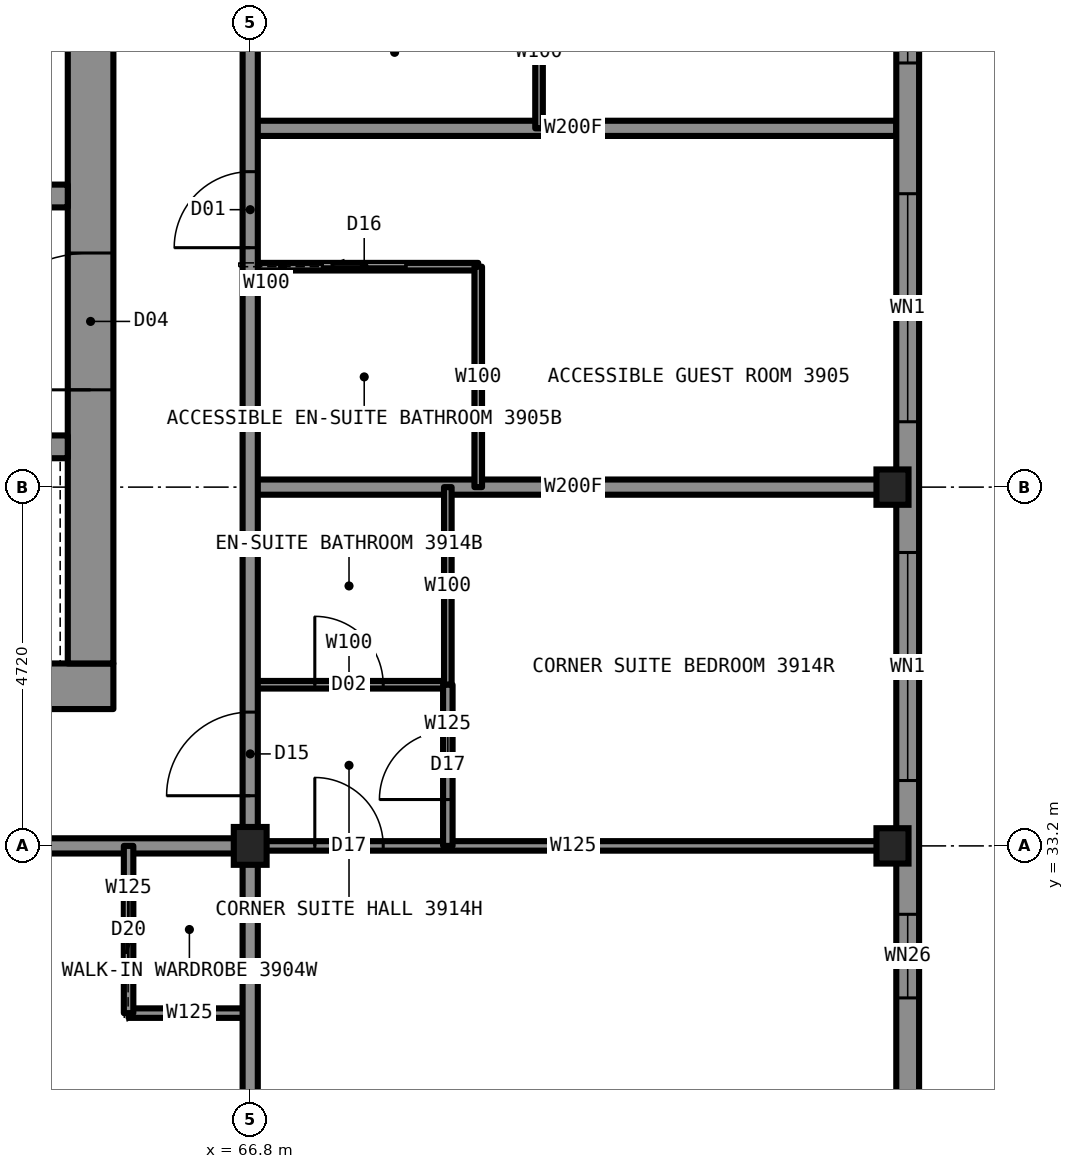
"""IFC4 building model, lengths in metres.
Left out: names, types, materials, properties, quantities, classifications, styles, units other than length and angle.
Written with IfcOpenShell. Run it as: python <this file> out.ifc"""

import sys

from ifc_helpers import new_model, si_unit, direction, frame, frame_2d, origin, origin_2d, place, context, subcontext, project, spatial, rectangle, i_section, extrude, element, fill, save


model = new_model("IFC4")
c1 = context("Model", 3, precision=1e-05, world=origin(), true_north=direction((0.0, 1.0)))
c2 = subcontext(c1, "Body", "Model", "MODEL_VIEW")
j1 = project(units=[si_unit("LENGTHUNIT", "METRE"), si_unit("PLANEANGLEUNIT", "RADIAN")], contexts=[c1])
p1 = place(None, origin())
s1 = spatial("IfcSite", under=j1, at=p1, CompositionType="ELEMENT")
p2 = place(p1, origin())
s2 = spatial("IfcBuilding", under=s1, at=p2, CompositionType="ELEMENT")
p3 = place(p2, frame((0.0, 0.0, 145.9)))
s3 = spatial("IfcBuildingStorey", under=s2, at=p3, CompositionType="ELEMENT", Elevation=145.9)
for number, where, z_axis, x_axis in (
    (1, (75.25, 33.2, 0.0), (0.0, 0.0, 1.0), (1.0, 0.0, 0.0)),
    (2, (75.25, 37.92, 0.0), (0.0, 0.0, 1.0), (1.0, 0.0, 0.0)),
):
    element("IfcColumn", number, at=place(p3, frame(where, z_axis=z_axis, x_axis=x_axis)), inside=s3, PredefinedType="COLUMN", context=c2, shape_type="SweptSolid", body=[
        extrude(i_section(OverallWidth=0.422, OverallDepth=0.465, WebThickness=0.045, FlangeThickness=0.073, at=origin_2d()), origin(), (0.0, 0.0, 1.0), 3.5),
    ])
p4 = place(p3, frame((66.8, 33.2, 0.0), z_axis=(0.0, 0.0, 1.0), x_axis=(1.0, 0.0, 0.0)))
e3 = element("IfcColumn", 3, at=p4, inside=s3, PredefinedType="COLUMN", context=c2, shape_type="SweptSolid", body=[
    extrude(i_section(OverallWidth=0.432, OverallDepth=0.498, WebThickness=0.056, FlangeThickness=0.089, at=origin_2d()), origin(), (0.0, 0.0, 1.0), 3.5),
])
p5 = place(p3, frame((45.0, 35.3, 0.0), z_axis=(0.0, 0.0, 1.0), x_axis=(1.0, 0.0, 0.0)))
e4 = element("IfcWall", 4, at=p5, inside=s3, PredefinedType="SHEAR", context=c2, shape_type="SweptSolid", body=[
    extrude(rectangle(XDim=20.0, YDim=0.6, at=frame_2d((10.0, 0.0))), origin(), (0.0, 0.0, 1.0), 3.5),
])
p6 = place(p3, frame((64.7, 35.6, 0.0), z_axis=(0.0, 0.0, 1.0), x_axis=(0.0, 1.0, 0.0)))
e5 = element("IfcWall", 5, at=p6, inside=s3, PredefinedType="SHEAR", context=c2, shape_type="SweptSolid", body=[
    extrude(rectangle(XDim=18.8, YDim=0.6, at=frame_2d((9.4, 0.0))), origin(), (0.0, 0.0, 1.0), 3.5),
])
p7 = place(p6, frame((13.4, 0.0, 0.0)))
e6 = element("IfcOpeningElement", 6, at=p7, cuts=e5, PredefinedType="OPENING", context=c2, shape_type="SweptSolid", body=[
    extrude(rectangle(XDim=1.8, YDim=2.2, at=frame_2d((0.9, 1.1))), frame((0.0, 0.31, 0.0), z_axis=(0.0, -1.0, 0.0), x_axis=(1.0, 0.0, 0.0)), (0.0, 0.0, 1.0), 0.62),
])
p8 = place(p6, frame((3.6, 0.0, 0.0)))
e7 = element("IfcOpeningElement", 7, at=p8, cuts=e5, PredefinedType="OPENING", context=c2, shape_type="SweptSolid", body=[
    extrude(rectangle(XDim=1.8, YDim=2.2, at=frame_2d((0.9, 1.1))), frame((0.0, 0.31, 0.0), z_axis=(0.0, -1.0, 0.0), x_axis=(1.0, 0.0, 0.0)), (0.0, 0.0, 1.0), 0.62),
])
p9 = place(p3, frame((45.6, 38.45, 0.0), z_axis=(0.0, 0.0, 1.0), x_axis=(1.0, 0.0, 0.0)))
e8 = element("IfcWall", 8, at=p9, inside=s3, PredefinedType="SHEAR", context=c2, shape_type="SweptSolid", body=[
    extrude(rectangle(XDim=18.8, YDim=0.3, at=frame_2d((9.4, 0.0))), origin(), (0.0, 0.0, 1.0), 3.5),
])
p10 = place(p3, frame((56.2, 41.75, 0.0), z_axis=(0.0, 0.0, 1.0), x_axis=(1.0, 0.0, 0.0)))
e9 = element("IfcWall", 9, at=p10, inside=s3, PredefinedType="SHEAR", context=c2, shape_type="SweptSolid", body=[
    extrude(rectangle(XDim=8.2, YDim=0.3, at=frame_2d((4.1, 0.0))), origin(), (0.0, 0.0, 1.0), 3.5),
])
p11 = place(p10, frame((3.3, 0.0, 0.0)))
e10 = element("IfcOpeningElement", 10, at=p11, cuts=e9, PredefinedType="OPENING", context=c2, shape_type="SweptSolid", body=[
    extrude(rectangle(XDim=1.0, YDim=2.1, at=frame_2d((0.5, 1.05))), frame((0.0, 0.16, 0.0), z_axis=(0.0, -1.0, 0.0), x_axis=(1.0, 0.0, 0.0)), (0.0, 0.0, 1.0), 0.32),
])
p12 = place(p3, frame((43.2, 33.2, 0.0), z_axis=(0.0, 0.0, 1.0), x_axis=(1.0, 0.0, 0.0)))
e11 = element("IfcWall", 11, at=p12, inside=s3, PredefinedType="PARTITIONING", context=c2, shape_type="SweptSolid", body=[
    extrude(rectangle(XDim=23.6, YDim=0.2, at=frame_2d((11.8, 0.0))), origin(), (0.0, 0.0, 1.0), 3.33),
])
p13 = place(p12, frame((1.85, 0.0, 0.0)))
e12 = element("IfcOpeningElement", 12, at=p13, cuts=e11, PredefinedType="OPENING", context=c2, shape_type="SweptSolid", body=[
    extrude(rectangle(XDim=1.1, YDim=2.2, at=frame_2d((0.55, 1.1))), frame((0.0, 0.11, 0.0), z_axis=(0.0, -1.0, 0.0), x_axis=(1.0, 0.0, 0.0)), (0.0, 0.0, 1.0), 0.22),
])
p14 = place(p12, frame((17.16, 0.0, 0.0)))
e13 = element("IfcOpeningElement", 13, at=p14, cuts=e11, PredefinedType="OPENING", context=c2, shape_type="SweptSolid", body=[
    extrude(rectangle(XDim=1.0, YDim=2.2, at=frame_2d((0.5, 1.1))), frame((0.0, 0.11, 0.0), z_axis=(0.0, -1.0, 0.0), x_axis=(1.0, 0.0, 0.0)), (0.0, 0.0, 1.0), 0.22),
])
p15 = place(p3, frame((66.8, 33.2, 0.0), z_axis=(0.0, 0.0, 1.0), x_axis=(1.0, 0.0, 0.0)))
e14 = element("IfcWall", 14, at=p15, inside=s3, PredefinedType="PARTITIONING", context=c2, shape_type="SweptSolid", body=[
    extrude(rectangle(XDim=8.5, YDim=0.125, at=frame_2d((4.25, 0.0))), origin(), (0.0, 0.0, 1.0), 2.573),
])
p16 = place(p15, frame((0.85, 0.0, 0.0)))
e15 = element("IfcOpeningElement", 15, at=p16, cuts=e14, PredefinedType="OPENING", context=c2, shape_type="SweptSolid", body=[
    extrude(rectangle(XDim=0.9, YDim=2.2, at=frame_2d((0.45, 1.1))), frame((0.0, 0.073, 0.0), z_axis=(0.0, -1.0, 0.0), x_axis=(1.0, 0.0, 0.0)), (0.0, 0.0, 1.0), 0.145),
])
p17 = place(p3, frame((65.2, 31.0, 0.0), z_axis=(0.0, 0.0, 1.0), x_axis=(1.0, 0.0, 0.0)))
e16 = element("IfcWall", 16, at=p17, inside=s3, PredefinedType="PARTITIONING", context=c2, shape_type="SweptSolid", body=[
    extrude(rectangle(XDim=1.6, YDim=0.125, at=frame_2d((0.8, 0.0))), origin(), (0.0, 0.0, 1.0), 3.33),
])
p18 = place(p3, frame((66.8, 42.64, 0.0), z_axis=(0.0, 0.0, 1.0), x_axis=(1.0, 0.0, 0.0)))
e17 = element("IfcWall", 17, at=p18, inside=s3, PredefinedType="PARTITIONING", context=c2, shape_type="SweptSolid", body=[
    extrude(rectangle(XDim=8.5, YDim=0.2, at=frame_2d((4.25, 0.0))), origin(), (0.0, 0.0, 1.0), 2.731),
])
p19 = place(p3, frame((66.8, 40.82, 0.0), z_axis=(0.0, 0.0, 1.0), x_axis=(1.0, 0.0, 0.0)))
e18 = element("IfcWall", 18, at=p19, inside=s3, PredefinedType="PARTITIONING", context=c2, shape_type="SweptSolid", body=[
    extrude(rectangle(XDim=3.0, YDim=0.1, at=frame_2d((1.5, 0.0))), origin(), (0.0, 0.0, 1.0), 3.33),
])
p20 = place(p19, frame((0.95, 0.0, 0.0)))
e19 = element("IfcOpeningElement", 19, at=p20, cuts=e18, PredefinedType="OPENING", context=c2, shape_type="SweptSolid", body=[
    extrude(rectangle(XDim=1.1, YDim=2.1, at=frame_2d((0.55, 1.05))), frame((0.0, 0.06, 0.0), z_axis=(0.0, -1.0, 0.0), x_axis=(1.0, 0.0, 0.0)), (0.0, 0.0, 1.0), 0.12),
])
p21 = place(p3, frame((66.8, 37.92, 0.0), z_axis=(0.0, 0.0, 1.0), x_axis=(1.0, 0.0, 0.0)))
e20 = element("IfcWall", 20, at=p21, inside=s3, PredefinedType="PARTITIONING", context=c2, shape_type="SweptSolid", body=[
    extrude(rectangle(XDim=8.5, YDim=0.2, at=frame_2d((4.25, 0.0))), origin(), (0.0, 0.0, 1.0), 2.573),
])
p22 = place(p3, frame((66.8, 35.32, 0.0), z_axis=(0.0, 0.0, 1.0), x_axis=(1.0, 0.0, 0.0)))
e21 = element("IfcWall", 21, at=p22, inside=s3, PredefinedType="PARTITIONING", context=c2, shape_type="SweptSolid", body=[
    extrude(rectangle(XDim=2.6, YDim=0.1, at=frame_2d((1.3, 0.0))), origin(), (0.0, 0.0, 1.0), 3.33),
])
p23 = place(p22, frame((0.85, 0.0, 0.0)))
e22 = element("IfcOpeningElement", 22, at=p23, cuts=e21, PredefinedType="OPENING", context=c2, shape_type="SweptSolid", body=[
    extrude(rectangle(XDim=0.9, YDim=2.1, at=frame_2d((0.45, 1.05))), frame((0.0, 0.06, 0.0), z_axis=(0.0, -1.0, 0.0), x_axis=(1.0, 0.0, 0.0)), (0.0, 0.0, 1.0), 0.12),
])
p24 = place(p3, frame((65.2, 31.0, 0.0), z_axis=(0.0, 0.0, 1.0), x_axis=(0.0, 1.0, 0.0)))
e23 = element("IfcWall", 23, at=p24, inside=s3, PredefinedType="PARTITIONING", context=c2, shape_type="SweptSolid", body=[
    extrude(rectangle(XDim=2.2, YDim=0.125, at=frame_2d((1.1, 0.0))), origin(), (0.0, 0.0, 1.0), 3.33),
])
p25 = place(p24, frame((0.7, 0.0, 0.0)))
e24 = element("IfcOpeningElement", 24, at=p25, cuts=e23, PredefinedType="OPENING", context=c2, shape_type="SweptSolid", body=[
    extrude(rectangle(XDim=0.8, YDim=2.1, at=frame_2d((0.4, 1.05))), frame((0.0, 0.073, 0.0), z_axis=(0.0, -1.0, 0.0), x_axis=(1.0, 0.0, 0.0)), (0.0, 0.0, 1.0), 0.145),
])
p26 = place(p3, frame((66.8, 33.2, 0.0), z_axis=(0.0, 0.0, 1.0), x_axis=(0.0, 1.0, 0.0)))
e25 = element("IfcWall", 25, at=p26, inside=s3, PredefinedType="PARTITIONING", context=c2, shape_type="SweptSolid", body=[
    extrude(rectangle(XDim=23.6, YDim=0.2, at=frame_2d((11.8, 0.0))), origin(), (0.0, 0.0, 1.0), 3.33),
])
p27 = place(p26, frame((7.87, 0.0, 0.0)))
e26 = element("IfcOpeningElement", 26, at=p27, cuts=e25, PredefinedType="OPENING", context=c2, shape_type="SweptSolid", body=[
    extrude(rectangle(XDim=1.0, YDim=2.2, at=frame_2d((0.5, 1.1))), frame((0.0, 0.11, 0.0), z_axis=(0.0, -1.0, 0.0), x_axis=(1.0, 0.0, 0.0)), (0.0, 0.0, 1.0), 0.22),
])
p28 = place(p26, frame((11.7, 0.0, 0.0)))
e27 = element("IfcOpeningElement", 27, at=p28, cuts=e25, PredefinedType="OPENING", context=c2, shape_type="SweptSolid", body=[
    extrude(rectangle(XDim=1.0, YDim=2.2, at=frame_2d((0.5, 1.1))), frame((0.0, 0.11, 0.0), z_axis=(0.0, -1.0, 0.0), x_axis=(1.0, 0.0, 0.0)), (0.0, 0.0, 1.0), 0.22),
])
p29 = place(p26, frame((14.56, 0.0, 0.0)))
e28 = element("IfcOpeningElement", 28, at=p29, cuts=e25, PredefinedType="OPENING", context=c2, shape_type="SweptSolid", body=[
    extrude(rectangle(XDim=1.0, YDim=2.2, at=frame_2d((0.5, 1.1))), frame((0.0, 0.11, 0.0), z_axis=(0.0, -1.0, 0.0), x_axis=(1.0, 0.0, 0.0)), (0.0, 0.0, 1.0), 0.22),
])
p30 = place(p26, frame((21.84, 0.0, 0.0)))
e29 = element("IfcOpeningElement", 29, at=p30, cuts=e25, PredefinedType="OPENING", context=c2, shape_type="SweptSolid", body=[
    extrude(rectangle(XDim=1.1, YDim=2.2, at=frame_2d((0.55, 1.1))), frame((0.0, 0.11, 0.0), z_axis=(0.0, -1.0, 0.0), x_axis=(1.0, 0.0, 0.0)), (0.0, 0.0, 1.0), 0.22),
])
p31 = place(p26, frame((0.66, 0.0, 0.0)))
e30 = element("IfcOpeningElement", 30, at=p31, cuts=e25, PredefinedType="OPENING", context=c2, shape_type="SweptSolid", body=[
    extrude(rectangle(XDim=1.1, YDim=2.2, at=frame_2d((0.55, 1.1))), frame((0.0, 0.11, 0.0), z_axis=(0.0, -1.0, 0.0), x_axis=(1.0, 0.0, 0.0)), (0.0, 0.0, 1.0), 0.22),
])
p32 = place(p3, frame((66.8, 24.7, 0.0), z_axis=(0.0, 0.0, 1.0), x_axis=(0.0, 1.0, 0.0)))
e31 = element("IfcWall", 31, at=p32, inside=s3, PredefinedType="PARTITIONING", context=c2, shape_type="SweptSolid", body=[
    extrude(rectangle(XDim=8.5, YDim=0.2, at=frame_2d((4.25, 0.0))), origin(), (0.0, 0.0, 1.0), 2.573),
])
p33 = place(p3, frame((69.4, 35.32, 0.0), z_axis=(0.0, 0.0, 1.0), x_axis=(0.0, 1.0, 0.0)))
e32 = element("IfcWall", 32, at=p33, inside=s3, PredefinedType="PARTITIONING", context=c2, shape_type="SweptSolid", body=[
    extrude(rectangle(XDim=2.6, YDim=0.1, at=frame_2d((1.3, 0.0))), origin(), (0.0, 0.0, 1.0), 3.33),
])
p34 = place(p3, frame((69.4, 33.2, 0.0), z_axis=(0.0, 0.0, 1.0), x_axis=(0.0, 1.0, 0.0)))
e33 = element("IfcWall", 33, at=p34, inside=s3, PredefinedType="PARTITIONING", context=c2, shape_type="SweptSolid", body=[
    extrude(rectangle(XDim=2.12, YDim=0.125, at=frame_2d((1.06, 0.0))), origin(), (0.0, 0.0, 1.0), 3.33),
])
p35 = place(p34, frame((0.61, 0.0, 0.0)))
e34 = element("IfcOpeningElement", 34, at=p35, cuts=e33, PredefinedType="OPENING", context=c2, shape_type="SweptSolid", body=[
    extrude(rectangle(XDim=0.9, YDim=2.2, at=frame_2d((0.45, 1.1))), frame((0.0, 0.073, 0.0), z_axis=(0.0, -1.0, 0.0), x_axis=(1.0, 0.0, 0.0)), (0.0, 0.0, 1.0), 0.145),
])
p36 = place(p3, frame((69.8, 37.92, 0.0), z_axis=(0.0, 0.0, 1.0), x_axis=(0.0, 1.0, 0.0)))
e35 = element("IfcWall", 35, at=p36, inside=s3, PredefinedType="PARTITIONING", context=c2, shape_type="SweptSolid", body=[
    extrude(rectangle(XDim=2.9, YDim=0.1, at=frame_2d((1.45, 0.0))), origin(), (0.0, 0.0, 1.0), 3.33),
])
p37 = place(p3, frame((70.6, 42.64, 0.0), z_axis=(0.0, 0.0, 1.0), x_axis=(0.0, 1.0, 0.0)))
e36 = element("IfcWall", 36, at=p37, inside=s3, PredefinedType="PARTITIONING", context=c2, shape_type="SweptSolid", body=[
    extrude(rectangle(XDim=2.0, YDim=0.1, at=frame_2d((1.0, 0.0))), origin(), (0.0, 0.0, 1.0), 3.33),
])
p38 = place(p3, frame((75.45, 29.9, 0.0), z_axis=(0.0, 0.0, 1.0), x_axis=(0.0, 1.0, 0.0)))
e37 = element("IfcWall", 37, at=p38, inside=s3, PredefinedType="SOLIDWALL", context=c2, shape_type="SweptSolid", body=[
    extrude(rectangle(XDim=30.2, YDim=0.3, at=frame_2d((15.1, 0.0))), origin(), (0.0, 0.0, 1.0), 2.83),
])
p39 = place(p38, frame((1.3, 0.0, 0.8)))
e38 = element("IfcOpeningElement", 38, at=p39, cuts=e37, PredefinedType="OPENING", context=c2, shape_type="SweptSolid", body=[
    extrude(rectangle(XDim=1.1, YDim=1.7, at=frame_2d((0.55, 0.85))), frame((0.0, 0.16, 0.0), z_axis=(0.0, -1.0, 0.0), x_axis=(1.0, 0.0, 0.0)), (0.0, 0.0, 1.0), 0.32),
])
p40 = place(p38, frame((4.16, 0.0, 0.5)))
e39 = element("IfcOpeningElement", 39, at=p40, cuts=e37, PredefinedType="OPENING", context=c2, shape_type="SweptSolid", body=[
    extrude(rectangle(XDim=3.0, YDim=2.0, at=frame_2d((1.5, 1.0))), frame((0.0, 0.16, 0.0), z_axis=(0.0, -1.0, 0.0), x_axis=(1.0, 0.0, 0.0)), (0.0, 0.0, 1.0), 0.32),
])
p41 = place(p38, frame((8.88, 0.0, 0.5)))
e40 = element("IfcOpeningElement", 40, at=p41, cuts=e37, PredefinedType="OPENING", context=c2, shape_type="SweptSolid", body=[
    extrude(rectangle(XDim=3.0, YDim=2.0, at=frame_2d((1.5, 1.0))), frame((0.0, 0.16, 0.0), z_axis=(0.0, -1.0, 0.0), x_axis=(1.0, 0.0, 0.0)), (0.0, 0.0, 1.0), 0.32),
])
p42 = place(p38, frame((13.6, 0.0, 0.5)))
e41 = element("IfcOpeningElement", 41, at=p42, cuts=e37, PredefinedType="OPENING", context=c2, shape_type="SweptSolid", body=[
    extrude(rectangle(XDim=3.0, YDim=2.0, at=frame_2d((1.5, 1.0))), frame((0.0, 0.16, 0.0), z_axis=(0.0, -1.0, 0.0), x_axis=(1.0, 0.0, 0.0)), (0.0, 0.0, 1.0), 0.32),
])
p43 = place(p38, frame((18.32, 0.0, 0.5)))
e42 = element("IfcOpeningElement", 42, at=p43, cuts=e37, PredefinedType="OPENING", context=c2, shape_type="SweptSolid", body=[
    extrude(rectangle(XDim=3.0, YDim=2.0, at=frame_2d((1.5, 1.0))), frame((0.0, 0.16, 0.0), z_axis=(0.0, -1.0, 0.0), x_axis=(1.0, 0.0, 0.0)), (0.0, 0.0, 1.0), 0.32),
])
p44 = place(p38, frame((23.04, 0.0, 0.5)))
e43 = element("IfcOpeningElement", 43, at=p44, cuts=e37, PredefinedType="OPENING", context=c2, shape_type="SweptSolid", body=[
    extrude(rectangle(XDim=3.0, YDim=2.0, at=frame_2d((1.5, 1.0))), frame((0.0, 0.16, 0.0), z_axis=(0.0, -1.0, 0.0), x_axis=(1.0, 0.0, 0.0)), (0.0, 0.0, 1.0), 0.32),
])
p45 = place(p38, frame((27.75, 0.0, 0.8)))
e44 = element("IfcOpeningElement", 44, at=p45, cuts=e37, PredefinedType="OPENING", context=c2, shape_type="SweptSolid", body=[
    extrude(rectangle(XDim=1.1, YDim=1.7, at=frame_2d((0.55, 0.85))), frame((0.0, 0.16, 0.0), z_axis=(0.0, -1.0, 0.0), x_axis=(1.0, 0.0, 0.0)), (0.0, 0.0, 1.0), 0.32),
])
p46 = place(p25, origin())
e45 = element("IfcDoor", 45, at=p46, inside=s3, OperationType="SLIDING_TO_LEFT", PredefinedType="DOOR", context=c2, shape_type="SweptSolid", body=[
    extrude(rectangle(XDim=0.8, YDim=2.1, at=frame_2d((0.4, 1.05))), frame((0.0, 0.025, 0.0), z_axis=(0.0, -1.0, 0.0), x_axis=(1.0, 0.0, 0.0)), (0.0, 0.0, 1.0), 0.05),
])
fill(e24, e45)
p47 = place(p27, origin())
e46 = element("IfcDoor", 46, at=p47, inside=s3, OperationType="SINGLE_SWING_LEFT", PredefinedType="DOOR", context=c2, shape_type="SweptSolid", body=[
    extrude(rectangle(XDim=1.0, YDim=2.2, at=frame_2d((0.5, 1.1))), frame((0.0, 0.025, 0.0), z_axis=(0.0, -1.0, 0.0), x_axis=(1.0, 0.0, 0.0)), (0.0, 0.0, 1.0), 0.05),
])
fill(e26, e46)
p48 = place(p20, origin())
e47 = element("IfcDoor", 47, at=p48, inside=s3, OperationType="SLIDING_TO_LEFT", PredefinedType="DOOR", context=c2, shape_type="SweptSolid", body=[
    extrude(rectangle(XDim=1.1, YDim=2.1, at=frame_2d((0.55, 1.05))), frame((0.0, 0.025, 0.0), z_axis=(0.0, -1.0, 0.0), x_axis=(1.0, 0.0, 0.0)), (0.0, 0.0, 1.0), 0.05),
])
fill(e19, e47)
p49 = place(p16, origin())
e48 = element("IfcDoor", 48, at=p49, inside=s3, OperationType="SINGLE_SWING_LEFT", PredefinedType="DOOR", context=c2, shape_type="SweptSolid", body=[
    extrude(rectangle(XDim=0.9, YDim=2.2, at=frame_2d((0.45, 1.1))), frame((0.0, 0.025, 0.0), z_axis=(0.0, -1.0, 0.0), x_axis=(1.0, 0.0, 0.0)), (0.0, 0.0, 1.0), 0.05),
])
fill(e15, e48)
p50 = place(p23, origin())
e49 = element("IfcDoor", 49, at=p50, inside=s3, OperationType="SINGLE_SWING_RIGHT", PredefinedType="DOOR", context=c2, shape_type="SweptSolid", body=[
    extrude(rectangle(XDim=0.9, YDim=2.1, at=frame_2d((0.45, 1.05))), frame((0.0, 0.025, 0.0), z_axis=(0.0, -1.0, 0.0), x_axis=(1.0, 0.0, 0.0)), (0.0, 0.0, 1.0), 0.05),
])
fill(e22, e49)
p51 = place(p31, origin())
e50 = element("IfcDoor", 50, at=p51, inside=s3, OperationType="SINGLE_SWING_LEFT", PredefinedType="DOOR", context=c2, shape_type="SweptSolid", body=[
    extrude(rectangle(XDim=1.1, YDim=2.2, at=frame_2d((0.55, 1.1))), frame((0.0, 0.025, 0.0), z_axis=(0.0, -1.0, 0.0), x_axis=(1.0, 0.0, 0.0)), (0.0, 0.0, 1.0), 0.05),
])
fill(e30, e50)
p52 = place(p35, origin())
e51 = element("IfcDoor", 51, at=p52, inside=s3, OperationType="SINGLE_SWING_LEFT", PredefinedType="DOOR", context=c2, shape_type="SweptSolid", body=[
    extrude(rectangle(XDim=0.9, YDim=2.2, at=frame_2d((0.45, 1.1))), frame((0.0, 0.025, 0.0), z_axis=(0.0, -1.0, 0.0), x_axis=(1.0, 0.0, 0.0)), (0.0, 0.0, 1.0), 0.05),
])
fill(e34, e51)
p53 = place(p39, origin())
e52 = element("IfcWindow", 52, at=p53, inside=s3, PartitioningType="SINGLE_PANEL", PredefinedType="WINDOW", context=c2, shape_type="SweptSolid", body=[
    extrude(rectangle(XDim=1.1, YDim=1.7, at=frame_2d((0.55, 0.85))), frame((0.0, 0.03, 0.0), z_axis=(0.0, -1.0, 0.0), x_axis=(1.0, 0.0, 0.0)), (0.0, 0.0, 1.0), 0.06),
])
fill(e38, e52)
p54 = place(p40, origin())
e53 = element("IfcWindow", 53, at=p54, inside=s3, PartitioningType="SINGLE_PANEL", PredefinedType="WINDOW", context=c2, shape_type="SweptSolid", body=[
    extrude(rectangle(XDim=3.0, YDim=2.0, at=frame_2d((1.5, 1.0))), frame((0.0, 0.03, 0.0), z_axis=(0.0, -1.0, 0.0), x_axis=(1.0, 0.0, 0.0)), (0.0, 0.0, 1.0), 0.06),
])
fill(e39, e53)
p55 = place(p41, origin())
e54 = element("IfcWindow", 54, at=p55, inside=s3, PartitioningType="SINGLE_PANEL", PredefinedType="WINDOW", context=c2, shape_type="SweptSolid", body=[
    extrude(rectangle(XDim=3.0, YDim=2.0, at=frame_2d((1.5, 1.0))), frame((0.0, 0.03, 0.0), z_axis=(0.0, -1.0, 0.0), x_axis=(1.0, 0.0, 0.0)), (0.0, 0.0, 1.0), 0.06),
])
fill(e40, e54)
p56 = place(p42, origin())
e55 = element("IfcWindow", 55, at=p56, inside=s3, PartitioningType="SINGLE_PANEL", PredefinedType="WINDOW", context=c2, shape_type="SweptSolid", body=[
    extrude(rectangle(XDim=3.0, YDim=2.0, at=frame_2d((1.5, 1.0))), frame((0.0, 0.03, 0.0), z_axis=(0.0, -1.0, 0.0), x_axis=(1.0, 0.0, 0.0)), (0.0, 0.0, 1.0), 0.06),
])
fill(e41, e55)
p57 = place(p8, origin())
e56 = element("IfcDoor", 56, at=p57, inside=s3, OperationType="DOUBLE_DOOR_SINGLE_SWING", PredefinedType="DOOR", context=c2, shape_type="SweptSolid", body=[
    extrude(rectangle(XDim=1.8, YDim=2.2, at=frame_2d((0.9, 1.1))), frame((0.0, 0.025, 0.0), z_axis=(0.0, -1.0, 0.0), x_axis=(1.0, 0.0, 0.0)), (0.0, 0.0, 1.0), 0.05),
])
fill(e7, e56)
save(model, sys.argv[1])
